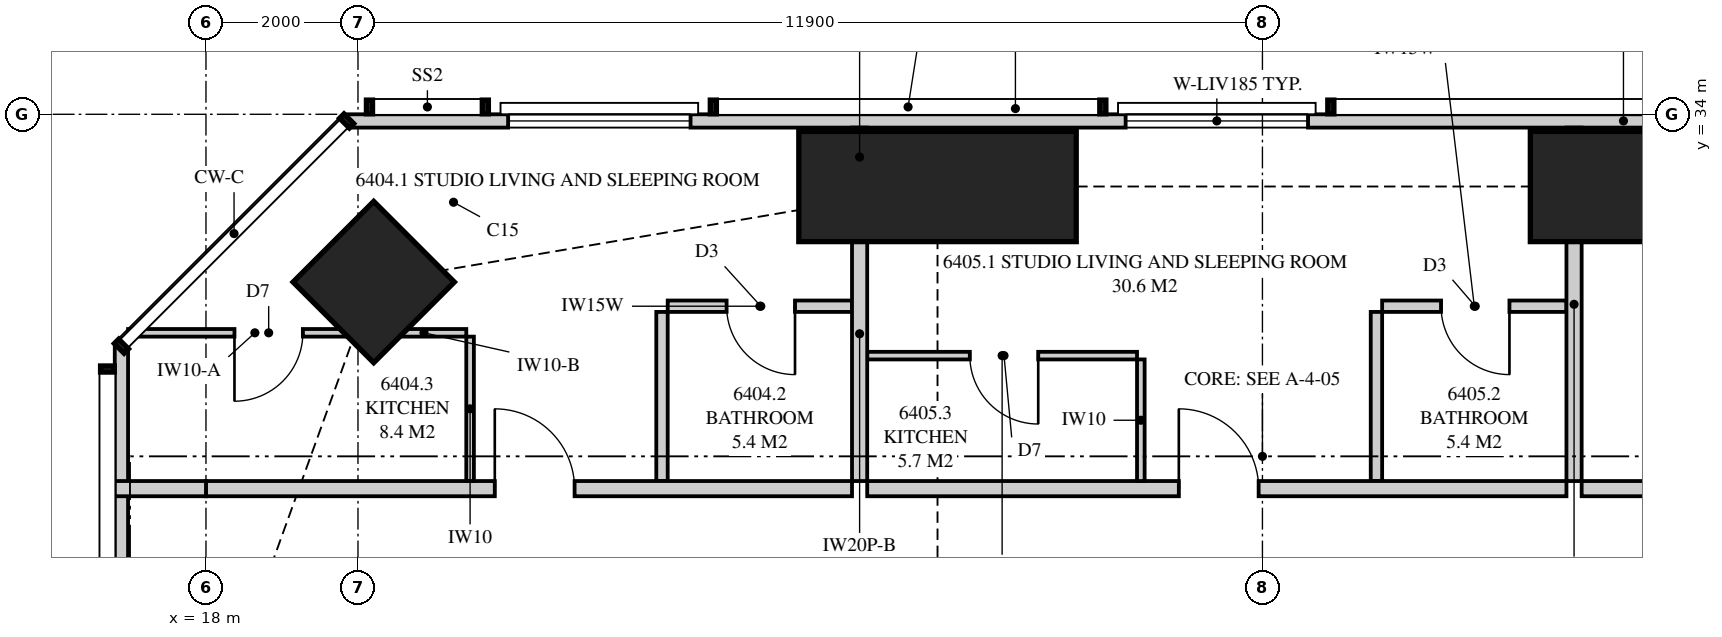
"""IFC4 building model, lengths in metres.
Left out: names, types, materials, properties, quantities, classifications, styles, units other than length and angle.
Written with IfcOpenShell. Run it as: python <this file> out.ifc"""

import sys

from ifc_helpers import new_model, si_unit, direction, frame, frame_2d, origin, origin_2d, place, context, subcontext, project, spatial, polyline, rectangle, outline, extrude, element, fill, save


model = new_model("IFC4")
c1 = context("Model", 3, precision=1e-05, world=origin(), true_north=direction((0.0, 1.0)))
c2 = subcontext(c1, "Body", "Model", "MODEL_VIEW")
j1 = project(units=[si_unit("LENGTHUNIT", "METRE"), si_unit("PLANEANGLEUNIT", "RADIAN")], contexts=[c1])
p1 = place(None, origin())
s1 = spatial("IfcSite", under=j1, at=p1, CompositionType="ELEMENT")
p2 = place(p1, origin())
s2 = spatial("IfcBuilding", under=s1, at=p2, CompositionType="ELEMENT")
p3 = place(p2, frame((0.0, 0.0, 235.45)))
s3 = spatial("IfcBuildingStorey", under=s2, at=p3, CompositionType="ELEMENT", Elevation=235.45)
for number, where, z_axis, x_axis in (
    (1, (37.25, 33.05, 0.0), (0.0, 0.0, 1.0), (0.0, 1.0, 0.0)),
    (2, (27.625, 33.05, 0.0), (0.0, 0.0, 1.0), (0.0, 1.0, 0.0)),
):
    element("IfcColumn", number, at=place(p3, frame(where, z_axis=z_axis, x_axis=x_axis)), inside=s3, PredefinedType="COLUMN", context=c2, shape_type="SweptSolid", body=[
        extrude(rectangle(XDim=1.45, YDim=3.65, at=origin_2d()), origin(), (0.0, 0.0, 1.0), 3.5),
    ])
p4 = place(p3, frame((20.207, 31.793, 0.0), z_axis=(0.0, 0.0, 1.0), x_axis=(0.707106781187, 0.707106781187, 0.0)))
e3 = element("IfcColumn", 3, at=p4, inside=s3, PredefinedType="COLUMN", context=c2, shape_type="SweptSolid", body=[
    extrude(rectangle(XDim=1.5, YDim=1.5, at=origin_2d()), origin(), (0.0, 0.0, 1.0), 3.5),
])
p5 = place(p3, frame((53.449, 33.913, 0.0), z_axis=(0.0, 0.0, 1.0), x_axis=(-1.0, 0.0, 0.0)))
e4 = element("IfcWall", 4, at=p5, inside=s3, PredefinedType="SOLIDWALL", context=c2, shape_type="SweptSolid", body=[
    extrude(outline(polyline([(0.0, 0.0), (33.597, 0.0), (33.597, 3.26), (26.039, 3.26), (26.039, 2.3), (25.955, 2.3), (25.955, 3.26), (25.824, 3.26), (25.824, 2.3), (6.574, 2.3), (6.574, 3.26), (6.442, 3.26), (6.442, 2.3), (6.359, 2.3), (6.359, 3.26), (0.0, 3.26), (0.0, 0.0)])), frame((0.0, 0.087, 0.0), z_axis=(0.0, -1.0, 0.0), x_axis=(1.0, 0.0, 0.0)), (0.0, 0.0, 1.0), 0.175),
])
p6 = place(p5, frame((0.6, 0.0, 0.0)))
e5 = element("IfcOpeningElement", 5, at=p6, cuts=e4, PredefinedType="OPENING", context=c2, shape_type="SweptSolid", body=[
    extrude(rectangle(XDim=1.8, YDim=2.25, at=frame_2d((0.9, 1.125))), frame((0.0, 0.097, 0.0), z_axis=(0.0, -1.0, 0.0), x_axis=(1.0, 0.0, 0.0)), (0.0, 0.0, 1.0), 0.195),
])
p7 = place(p5, frame((2.835, 0.0, 0.4)))
e6 = element("IfcOpeningElement", 6, at=p7, cuts=e4, PredefinedType="OPENING", context=c2, shape_type="SweptSolid", body=[
    extrude(rectangle(XDim=1.8, YDim=1.85, at=frame_2d((0.9, 0.925))), frame((0.0, 0.097, 0.0), z_axis=(0.0, -1.0, 0.0), x_axis=(1.0, 0.0, 0.0)), (0.0, 0.0, 1.0), 0.195),
])
p8 = place(p5, frame((9.249, 0.0, 0.4)))
e7 = element("IfcOpeningElement", 7, at=p8, cuts=e4, PredefinedType="OPENING", context=c2, shape_type="SweptSolid", body=[
    extrude(rectangle(XDim=1.8, YDim=1.85, at=frame_2d((0.9, 0.925))), frame((0.0, 0.097, 0.0), z_axis=(0.0, -1.0, 0.0), x_axis=(1.0, 0.0, 0.0)), (0.0, 0.0, 1.0), 0.195),
])
p9 = place(p5, frame((12.42, 0.0, 0.4)))
e8 = element("IfcOpeningElement", 8, at=p9, cuts=e4, PredefinedType="OPENING", context=c2, shape_type="SweptSolid", body=[
    extrude(rectangle(XDim=1.8, YDim=1.85, at=frame_2d((0.9, 0.925))), frame((0.0, 0.097, 0.0), z_axis=(0.0, -1.0, 0.0), x_axis=(1.0, 0.0, 0.0)), (0.0, 0.0, 1.0), 0.195),
])
p10 = place(p5, frame((20.949, 0.0, 0.4)))
e9 = element("IfcOpeningElement", 9, at=p10, cuts=e4, PredefinedType="OPENING", context=c2, shape_type="SweptSolid", body=[
    extrude(rectangle(XDim=2.4, YDim=1.85, at=frame_2d((1.2, 0.925))), frame((0.0, 0.097, 0.0), z_axis=(0.0, -1.0, 0.0), x_axis=(1.0, 0.0, 0.0)), (0.0, 0.0, 1.0), 0.195),
])
p11 = place(p5, frame((29.073, 0.0, 0.4)))
e10 = element("IfcOpeningElement", 10, at=p11, cuts=e4, PredefinedType="OPENING", context=c2, shape_type="SweptSolid", body=[
    extrude(rectangle(XDim=2.4, YDim=1.85, at=frame_2d((1.2, 0.925))), frame((0.0, 0.097, 0.0), z_axis=(0.0, -1.0, 0.0), x_axis=(1.0, 0.0, 0.0)), (0.0, 0.0, 1.0), 0.195),
])
p12 = place(p3, frame((16.887, 30.949, 0.0), z_axis=(0.0, 0.0, 1.0), x_axis=(0.0, -1.0, 0.0)))
e11 = element("IfcWall", 11, at=p12, inside=s3, PredefinedType="SOLIDWALL", context=c2, shape_type="SweptSolid", body=[
    extrude(outline(polyline([(0.0, 0.0), (27.897, 0.0), (27.897, 3.26), (18.148, 3.26), (18.148, 2.3), (18.125, 2.3), (18.125, 3.26), (17.949, 3.26), (17.949, 2.3), (5.949, 2.3), (5.949, 3.26), (0.0, 3.26), (0.0, 0.0)])), frame((0.0, 0.087, 0.0), z_axis=(0.0, -1.0, 0.0), x_axis=(1.0, 0.0, 0.0)), (0.0, 0.0, 1.0), 0.175),
])
p13 = place(p12, frame((11.849, 0.0, 0.4)))
e12 = element("IfcOpeningElement", 12, at=p13, cuts=e11, PredefinedType="OPENING", context=c2, shape_type="SweptSolid", body=[
    extrude(rectangle(XDim=1.2, YDim=1.85, at=frame_2d((0.6, 0.925))), frame((0.0, 0.097, 0.0), z_axis=(0.0, -1.0, 0.0), x_axis=(1.0, 0.0, 0.0)), (0.0, 0.0, 1.0), 0.195),
])
p14 = place(p3, frame((26.6, 33.825, 0.0), z_axis=(0.0, 0.0, 1.0), x_axis=(0.0, -1.0, 0.0)))
e13 = element("IfcWall", 13, at=p14, inside=s3, PredefinedType="PARTITIONING", context=c2, shape_type="SweptSolid", body=[
    extrude(outline(polyline([(0.026, 2.3), (0.026, 3.26), (0.0, 3.26), (0.0, 0.0), (0.529, 0.0), (0.529, 0.539), (0.775, 0.539), (0.775, 1.761), (0.529, 1.761), (0.529, 2.3), (0.026, 2.3)])), frame((0.0, 0.1, 0.0), z_axis=(0.0, -1.0, 0.0), x_axis=(1.0, 0.0, 0.0)), (0.0, 0.0, 1.0), 0.2),
])
p15 = place(p3, frame((26.6, 33.05, 0.0), z_axis=(0.0, 0.0, 1.0), x_axis=(0.0, -1.0, 0.0)))
e14 = element("IfcWall", 14, at=p15, inside=s3, PredefinedType="PARTITIONING", context=c2, shape_type="SweptSolid", body=[
    extrude(outline(polyline([(0.246, 2.3), (0.246, 1.761), (0.0, 1.761), (0.0, 0.539), (0.246, 0.539), (0.246, 0.0), (3.875, 0.0), (3.875, 2.66), (1.097, 2.66), (1.097, 2.3), (0.246, 2.3)])), frame((0.0, 0.1, 0.0), z_axis=(0.0, -1.0, 0.0), x_axis=(1.0, 0.0, 0.0)), (0.0, 0.0, 1.0), 0.2),
])
p16 = place(p3, frame((18.0, 29.075, 0.0), z_axis=(0.0, 0.0, 1.0), x_axis=(1.0, 0.0, 0.0)))
e15 = element("IfcWall", 15, at=p16, inside=s3, PredefinedType="PARTITIONING", context=c2, shape_type="SweptSolid", body=[
    extrude(outline(polyline([(0.0, 0.0), (8.5, 0.0), (8.5, 3.26), (8.5, 2.66), (8.315, 2.66), (8.315, 3.26), (2.192, 3.26), (2.192, 2.3), (0.256, 2.3), (0.256, 3.26), (0.0, 3.26), (0.0, 0.0)])), frame((0.0, 0.1, 0.0), z_axis=(0.0, -1.0, 0.0), x_axis=(1.0, 0.0, 0.0)), (0.0, 0.0, 1.0), 0.2),
])
p17 = place(p16, frame((3.8, 0.0, 0.0)))
e16 = element("IfcOpeningElement", 16, at=p17, cuts=e15, PredefinedType="OPENING", context=c2, shape_type="SweptSolid", body=[
    extrude(rectangle(XDim=1.05, YDim=2.2, at=frame_2d((0.525, 1.1))), frame((0.0, 0.11, 0.0), z_axis=(0.0, -1.0, 0.0), x_axis=(1.0, 0.0, 0.0)), (0.0, 0.0, 1.0), 0.22),
])
p18 = place(p3, frame((24.075, 31.475, 0.0), z_axis=(0.0, 0.0, 1.0), x_axis=(1.0, 0.0, 0.0)))
e17 = element("IfcWall", 17, at=p18, inside=s3, PredefinedType="PLUMBINGWALL", context=c2, shape_type="SweptSolid", body=[
    extrude(outline(polyline([(0.0, 0.0), (2.425, 0.0), (2.425, 3.26), (2.425, 2.66), (2.265, 2.66), (2.265, 3.26), (0.0, 3.26), (0.0, 0.0)])), frame((0.0, 0.075, 0.0), z_axis=(0.0, -1.0, 0.0), x_axis=(1.0, 0.0, 0.0)), (0.0, 0.0, 1.0), 0.15),
])
p19 = place(p18, frame((0.775, 0.0, 0.0)))
e18 = element("IfcOpeningElement", 18, at=p19, cuts=e17, PredefinedType="OPENING", context=c2, shape_type="SweptSolid", body=[
    extrude(rectangle(XDim=0.9, YDim=2.1, at=frame_2d((0.45, 1.05))), frame((0.0, 0.085, 0.0), z_axis=(0.0, -1.0, 0.0), x_axis=(1.0, 0.0, 0.0)), (0.0, 0.0, 1.0), 0.17),
])
p20 = place(p3, frame((24.0, 31.4, 0.0), z_axis=(0.0, 0.0, 1.0), x_axis=(0.0, -1.0, 0.0)))
e19 = element("IfcWall", 19, at=p20, inside=s3, PredefinedType="PLUMBINGWALL", context=c2, shape_type="SweptSolid", body=[
    extrude(rectangle(XDim=2.225, YDim=0.15, at=frame_2d((1.112, 0.0))), origin(), (0.0, 0.0, 1.0), 3.26),
])
p21 = place(p3, frame((16.975, 31.125, 0.0), z_axis=(0.0, 0.0, 1.0), x_axis=(1.0, 0.0, 0.0)))
e20 = element("IfcWall", 20, at=p21, inside=s3, PredefinedType="PARTITIONING", context=c2, shape_type="SweptSolid", body=[
    extrude(outline(polyline([(0.0, 0.0), (3.337, 0.0), (3.337, 2.3), (2.076, 2.3), (2.076, 3.26), (0.0, 3.26), (0.0, 0.0)])), frame((0.0, 0.05, 0.0), z_axis=(0.0, -1.0, 0.0), x_axis=(1.0, 0.0, 0.0)), (0.0, 0.0, 1.0), 0.1),
])
p22 = place(p21, frame((1.4, 0.0, 0.0)))
e21 = element("IfcOpeningElement", 21, at=p22, cuts=e20, PredefinedType="OPENING", context=c2, shape_type="SweptSolid", body=[
    extrude(rectangle(XDim=0.9, YDim=2.1, at=frame_2d((0.45, 1.05))), frame((0.0, 0.06, 0.0), z_axis=(0.0, -1.0, 0.0), x_axis=(1.0, 0.0, 0.0)), (0.0, 0.0, 1.0), 0.12),
])
p23 = place(p3, frame((20.312, 31.125, 0.0), z_axis=(0.0, 0.0, 1.0), x_axis=(1.0, 0.0, 0.0)))
e22 = element("IfcWall", 22, at=p23, inside=s3, PredefinedType="PARTITIONING", context=c2, shape_type="SweptSolid", body=[
    extrude(rectangle(XDim=1.113, YDim=0.1, at=frame_2d((0.557, 0.0))), origin(), (0.0, 0.0, 1.0), 2.3),
])
p24 = place(p3, frame((21.475, 31.075, 0.0), z_axis=(0.0, 0.0, 1.0), x_axis=(0.0, -1.0, 0.0)))
e23 = element("IfcWall", 23, at=p24, inside=s3, PredefinedType="PARTITIONING", context=c2, shape_type="SweptSolid", body=[
    extrude(rectangle(XDim=1.9, YDim=0.1, at=frame_2d((0.95, 0.0))), origin(), (0.0, 0.0, 1.0), 3.26),
])
p25 = place(p3, frame((36.0, 33.825, 0.0), z_axis=(0.0, 0.0, 1.0), x_axis=(0.0, -1.0, 0.0)))
e24 = element("IfcWall", 24, at=p25, inside=s3, PredefinedType="PARTITIONING", context=c2, shape_type="SweptSolid", body=[
    extrude(outline(polyline([(0.529, 2.3), (0.0, 2.3), (0.0, 0.0), (0.529, 0.0), (0.529, 0.281), (1.021, 0.281), (1.021, 0.0), (4.65, 0.0), (4.65, 2.66), (1.685, 2.66), (1.685, 2.3), (1.021, 2.3), (1.021, 2.019), (0.529, 2.019), (0.529, 2.3)])), frame((0.0, 0.1, 0.0), z_axis=(0.0, -1.0, 0.0), x_axis=(1.0, 0.0, 0.0)), (0.0, 0.0, 1.0), 0.2),
])
p26 = place(p3, frame((26.7, 29.075, 0.0), z_axis=(0.0, 0.0, 1.0), x_axis=(1.0, 0.0, 0.0)))
e25 = element("IfcWall", 25, at=p26, inside=s3, PredefinedType="PARTITIONING", context=c2, shape_type="SweptSolid", body=[
    extrude(outline(polyline([(0.0, 0.0), (9.2, 0.0), (9.2, 3.26), (2.235, 3.26), (2.235, 2.66), (0.0, 2.66), (0.0, 3.26), (0.0, 0.0)])), frame((0.0, 0.1, 0.0), z_axis=(0.0, -1.0, 0.0), x_axis=(1.0, 0.0, 0.0)), (0.0, 0.0, 1.0), 0.2),
])
p27 = place(p26, frame((4.1, 0.0, 0.0)))
e26 = element("IfcOpeningElement", 26, at=p27, cuts=e25, PredefinedType="OPENING", context=c2, shape_type="SweptSolid", body=[
    extrude(rectangle(XDim=1.05, YDim=2.2, at=frame_2d((0.525, 1.1))), frame((0.0, 0.11, 0.0), z_axis=(0.0, -1.0, 0.0), x_axis=(1.0, 0.0, 0.0)), (0.0, 0.0, 1.0), 0.22),
])
p28 = place(p3, frame((33.475, 31.475, 0.0), z_axis=(0.0, 0.0, 1.0), x_axis=(1.0, 0.0, 0.0)))
e27 = element("IfcWall", 27, at=p28, inside=s3, PredefinedType="PLUMBINGWALL", context=c2, shape_type="SweptSolid", body=[
    extrude(rectangle(XDim=2.425, YDim=0.15, at=frame_2d((1.212, 0.0))), origin(), (0.0, 0.0, 1.0), 3.26),
])
p29 = place(p28, frame((0.775, 0.0, 0.0)))
e28 = element("IfcOpeningElement", 28, at=p29, cuts=e27, PredefinedType="OPENING", context=c2, shape_type="SweptSolid", body=[
    extrude(rectangle(XDim=0.9, YDim=2.1, at=frame_2d((0.45, 1.05))), frame((0.0, 0.085, 0.0), z_axis=(0.0, -1.0, 0.0), x_axis=(1.0, 0.0, 0.0)), (0.0, 0.0, 1.0), 0.17),
])
p30 = place(p3, frame((33.4, 31.4, 0.0), z_axis=(0.0, 0.0, 1.0), x_axis=(0.0, -1.0, 0.0)))
e29 = element("IfcWall", 29, at=p30, inside=s3, PredefinedType="PLUMBINGWALL", context=c2, shape_type="SweptSolid", body=[
    extrude(rectangle(XDim=2.225, YDim=0.15, at=frame_2d((1.112, 0.0))), origin(), (0.0, 0.0, 1.0), 3.26),
])
p31 = place(p3, frame((26.7, 30.825, 0.0), z_axis=(0.0, 0.0, 1.0), x_axis=(1.0, 0.0, 0.0)))
e30 = element("IfcWall", 30, at=p31, inside=s3, PredefinedType="PARTITIONING", context=c2, shape_type="SweptSolid", body=[
    extrude(outline(polyline([(0.0, 0.0), (3.55, 0.0), (3.55, 3.26), (2.185, 3.26), (2.185, 2.66), (0.0, 2.66), (0.0, 3.26), (0.0, 0.0)])), frame((0.0, 0.05, 0.0), z_axis=(0.0, -1.0, 0.0), x_axis=(1.0, 0.0, 0.0)), (0.0, 0.0, 1.0), 0.1),
])
p32 = place(p31, frame((1.35, 0.0, 0.0)))
e31 = element("IfcOpeningElement", 31, at=p32, cuts=e30, PredefinedType="OPENING", context=c2, shape_type="SweptSolid", body=[
    extrude(rectangle(XDim=0.9, YDim=2.1, at=frame_2d((0.45, 1.05))), frame((0.0, 0.06, 0.0), z_axis=(0.0, -1.0, 0.0), x_axis=(1.0, 0.0, 0.0)), (0.0, 0.0, 1.0), 0.12),
])
p33 = place(p3, frame((30.3, 30.775, 0.0), z_axis=(0.0, 0.0, 1.0), x_axis=(0.0, -1.0, 0.0)))
e32 = element("IfcWall", 32, at=p33, inside=s3, PredefinedType="PARTITIONING", context=c2, shape_type="SweptSolid", body=[
    extrude(rectangle(XDim=1.6, YDim=0.1, at=frame_2d((0.8, 0.0))), origin(), (0.0, 0.0, 1.0), 3.26),
])
p34 = place(p3, frame((36.1, 29.075, 0.0), z_axis=(0.0, 0.0, 1.0), x_axis=(1.0, 0.0, 0.0)))
e33 = element("IfcWall", 33, at=p34, inside=s3, PredefinedType="PARTITIONING", context=c2, shape_type="SweptSolid", body=[
    extrude(outline(polyline([(0.0, 0.0), (20.225, 0.0), (20.225, 3.26), (19.621, 3.26), (19.621, 2.3), (17.771, 2.3), (17.771, 3.26), (12.085, 3.26), (12.085, 2.66), (9.465, 2.66), (9.465, 3.26), (2.46, 3.26), (2.46, 2.66), (0.0, 2.66), (0.0, 3.26), (0.0, 0.0)])), frame((0.0, 0.1, 0.0), z_axis=(0.0, -1.0, 0.0), x_axis=(1.0, 0.0, 0.0)), (0.0, 0.0, 1.0), 0.2),
])
p35 = place(p34, frame((9.65, 0.0, 0.0)))
e34 = element("IfcOpeningElement", 34, at=p35, cuts=e33, PredefinedType="OPENING", context=c2, shape_type="SweptSolid", body=[
    extrude(rectangle(XDim=1.05, YDim=2.2, at=frame_2d((0.525, 1.1))), frame((0.0, 0.11, 0.0), z_axis=(0.0, -1.0, 0.0), x_axis=(1.0, 0.0, 0.0)), (0.0, 0.0, 1.0), 0.22),
])
p36 = place(p3, frame((16.8, 29.075, 0.0), z_axis=(0.0, 0.0, 1.0), x_axis=(1.0, 0.0, 0.0)))
e35 = element("IfcWall", 35, at=p36, inside=s3, PredefinedType="PARTITIONING", context=c2, shape_type="SweptSolid", body=[
    extrude(rectangle(XDim=1.2, YDim=0.2, at=frame_2d((0.6, 0.0))), origin(), (0.0, 0.0, 1.0), 3.26),
])
p37 = place(p10, origin())
e36 = element("IfcWindow", 36, at=p37, inside=s3, PartitioningType="SINGLE_PANEL", PredefinedType="WINDOW", context=c2, shape_type="SweptSolid", body=[
    extrude(rectangle(XDim=2.4, YDim=1.85, at=frame_2d((1.2, 0.925))), frame((0.0, 0.03, 0.0), z_axis=(0.0, -1.0, 0.0), x_axis=(1.0, 0.0, 0.0)), (0.0, 0.0, 1.0), 0.06),
])
fill(e9, e36)
p38 = place(p11, origin())
e37 = element("IfcWindow", 37, at=p38, inside=s3, PartitioningType="SINGLE_PANEL", PredefinedType="WINDOW", context=c2, shape_type="SweptSolid", body=[
    extrude(rectangle(XDim=2.4, YDim=1.85, at=frame_2d((1.2, 0.925))), frame((0.0, 0.03, 0.0), z_axis=(0.0, -1.0, 0.0), x_axis=(1.0, 0.0, 0.0)), (0.0, 0.0, 1.0), 0.06),
])
fill(e10, e37)
p39 = place(p17, origin())
e38 = element("IfcDoor", 38, at=p39, inside=s3, OperationType="SINGLE_SWING_LEFT", PredefinedType="DOOR", context=c2, shape_type="SweptSolid", body=[
    extrude(rectangle(XDim=1.05, YDim=2.2, at=frame_2d((0.525, 1.1))), frame((0.0, 0.025, 0.0), z_axis=(0.0, -1.0, 0.0), x_axis=(1.0, 0.0, 0.0)), (0.0, 0.0, 1.0), 0.05),
])
fill(e16, e38)
p40 = place(p19, frame((0.9, 0.0, 0.0), z_axis=(0.0, 0.0, 1.0), x_axis=(-1.0, 0.0, 0.0)))
e39 = element("IfcDoor", 39, at=p40, inside=s3, OperationType="SINGLE_SWING_LEFT", PredefinedType="DOOR", context=c2, shape_type="SweptSolid", body=[
    extrude(rectangle(XDim=0.9, YDim=2.1, at=frame_2d((0.45, 1.05))), frame((0.0, 0.025, 0.0), z_axis=(0.0, -1.0, 0.0), x_axis=(1.0, 0.0, 0.0)), (0.0, 0.0, 1.0), 0.05),
])
fill(e18, e39)
p41 = place(p22, frame((0.9, 0.0, 0.0), z_axis=(0.0, 0.0, 1.0), x_axis=(-1.0, 0.0, 0.0)))
e40 = element("IfcDoor", 40, at=p41, inside=s3, OperationType="SINGLE_SWING_RIGHT", PredefinedType="DOOR", context=c2, shape_type="SweptSolid", body=[
    extrude(rectangle(XDim=0.9, YDim=2.1, at=frame_2d((0.45, 1.05))), frame((0.0, 0.025, 0.0), z_axis=(0.0, -1.0, 0.0), x_axis=(1.0, 0.0, 0.0)), (0.0, 0.0, 1.0), 0.05),
])
fill(e21, e40)
p42 = place(p27, origin())
e41 = element("IfcDoor", 41, at=p42, inside=s3, OperationType="SINGLE_SWING_LEFT", PredefinedType="DOOR", context=c2, shape_type="SweptSolid", body=[
    extrude(rectangle(XDim=1.05, YDim=2.2, at=frame_2d((0.525, 1.1))), frame((0.0, 0.025, 0.0), z_axis=(0.0, -1.0, 0.0), x_axis=(1.0, 0.0, 0.0)), (0.0, 0.0, 1.0), 0.05),
])
fill(e26, e41)
p43 = place(p29, frame((0.9, 0.0, 0.0), z_axis=(0.0, 0.0, 1.0), x_axis=(-1.0, 0.0, 0.0)))
e42 = element("IfcDoor", 42, at=p43, inside=s3, OperationType="SINGLE_SWING_LEFT", PredefinedType="DOOR", context=c2, shape_type="SweptSolid", body=[
    extrude(rectangle(XDim=0.9, YDim=2.1, at=frame_2d((0.45, 1.05))), frame((0.0, 0.025, 0.0), z_axis=(0.0, -1.0, 0.0), x_axis=(1.0, 0.0, 0.0)), (0.0, 0.0, 1.0), 0.05),
])
fill(e28, e42)
p44 = place(p32, frame((0.9, 0.0, 0.0), z_axis=(0.0, 0.0, 1.0), x_axis=(-1.0, 0.0, 0.0)))
e43 = element("IfcDoor", 43, at=p44, inside=s3, OperationType="SINGLE_SWING_LEFT", PredefinedType="DOOR", context=c2, shape_type="SweptSolid", body=[
    extrude(rectangle(XDim=0.9, YDim=2.1, at=frame_2d((0.45, 1.05))), frame((0.0, 0.025, 0.0), z_axis=(0.0, -1.0, 0.0), x_axis=(1.0, 0.0, 0.0)), (0.0, 0.0, 1.0), 0.05),
])
fill(e31, e43)
save(model, sys.argv[1])
